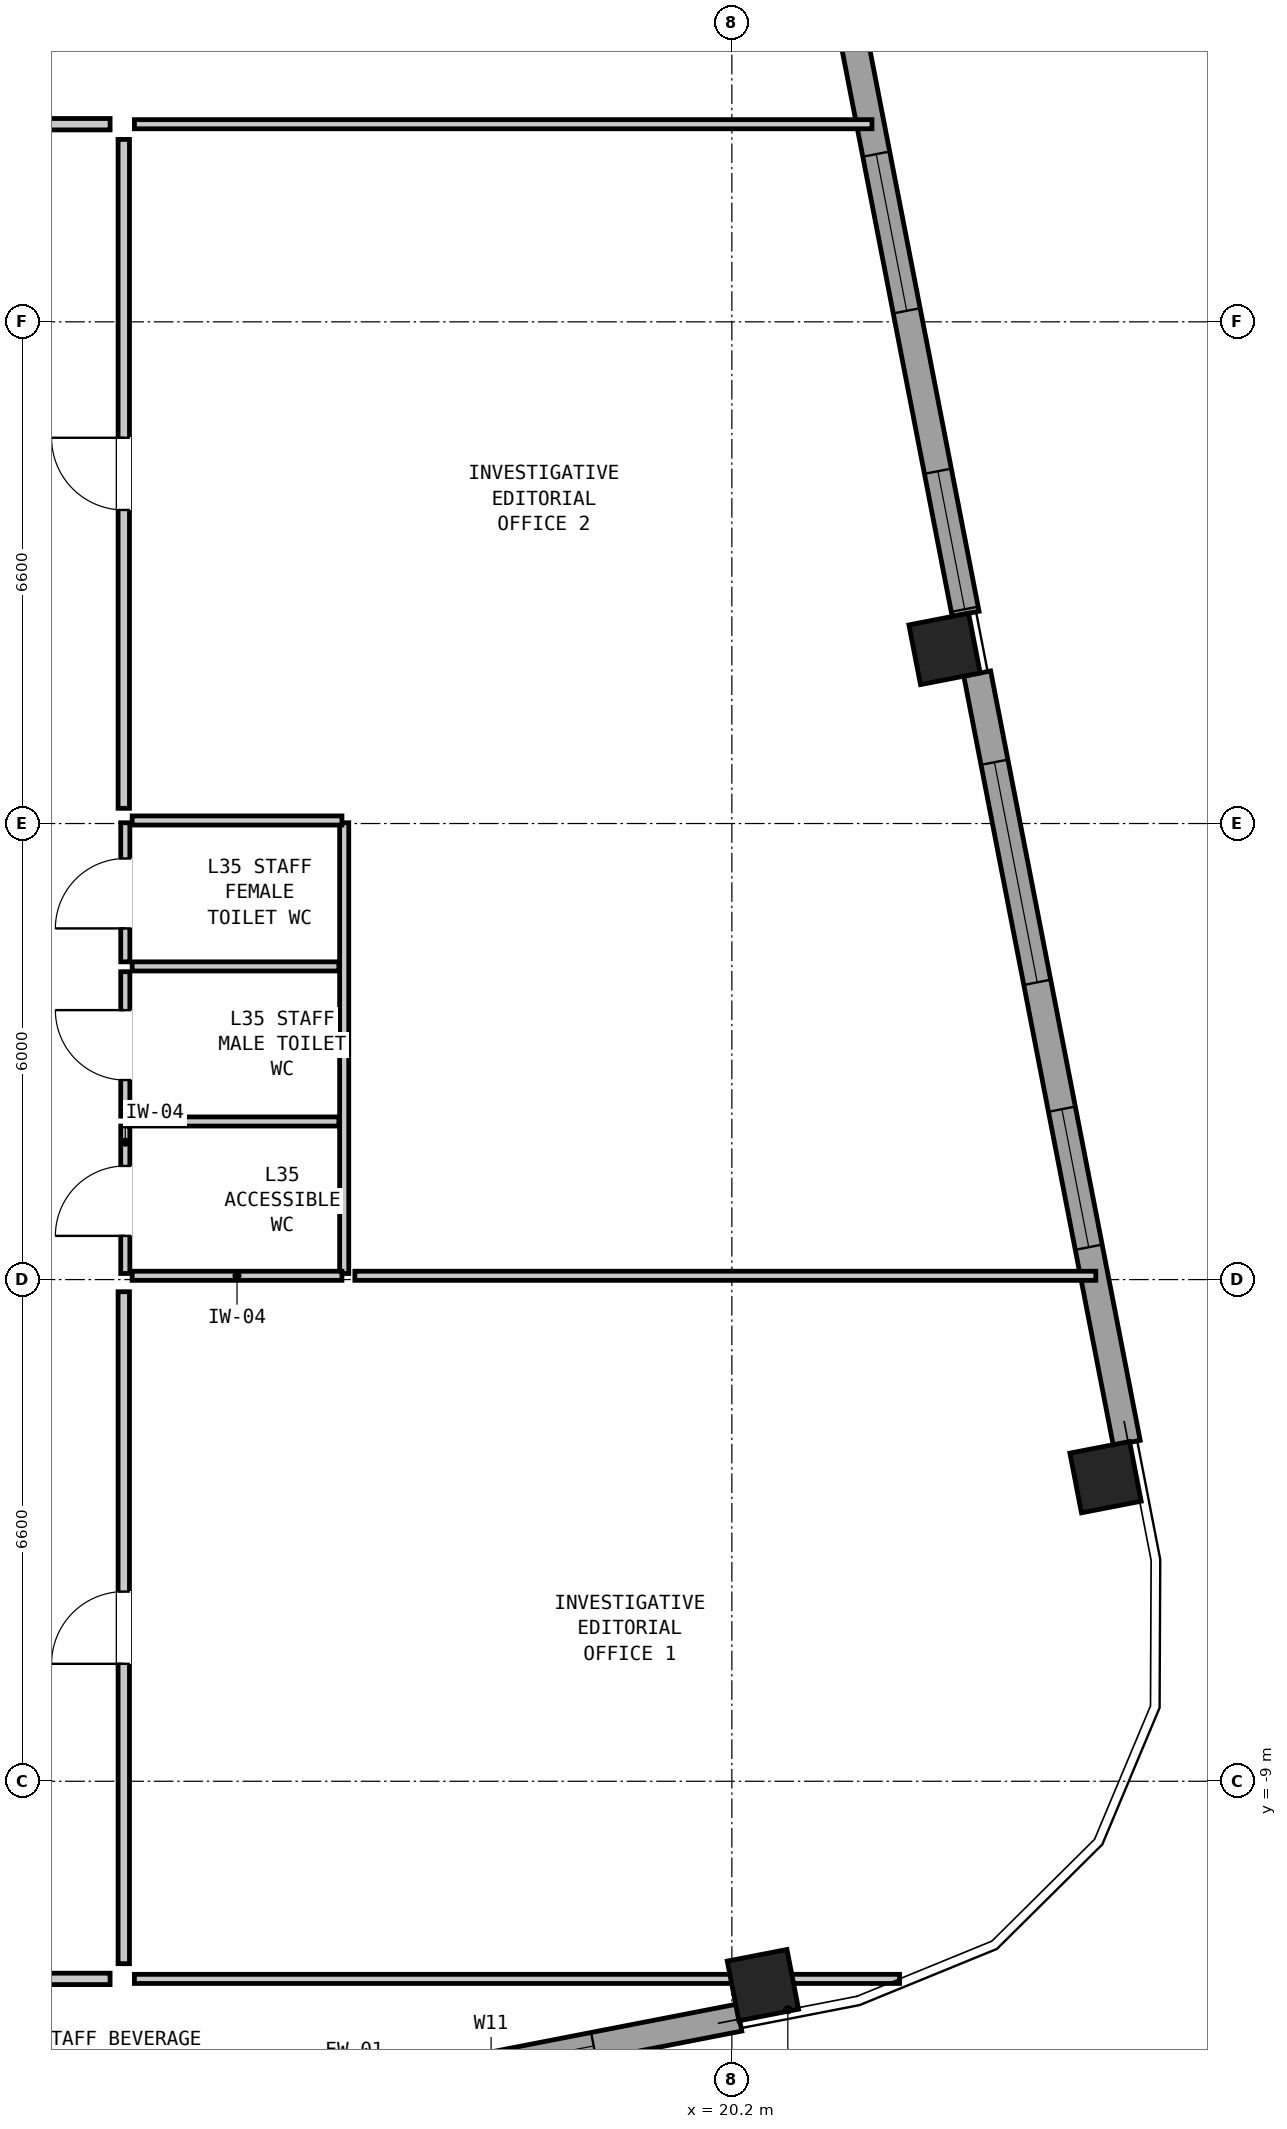
"""IFC4 building model, lengths in metres.
Left out: names, types, materials, properties, quantities, classifications, styles, units other than length and angle.
Written with IfcOpenShell. Run it as: python <this file> out.ifc"""

import sys

from ifc_helpers import new_model, si_unit, direction, frame, frame_2d, origin, origin_2d, place, context, subcontext, project, spatial, rectangle, hollow_rectangle, extrude, element, fill, save


model = new_model("IFC4")
c1 = context("Model", 3, precision=1e-05, world=origin(), true_north=direction((0.0, 1.0)))
c2 = subcontext(c1, "Body", "Model", "MODEL_VIEW")
j1 = project(units=[si_unit("LENGTHUNIT", "METRE"), si_unit("PLANEANGLEUNIT", "RADIAN")], contexts=[c1])
p1 = place(None, origin())
s1 = spatial("IfcSite", under=j1, at=p1, CompositionType="ELEMENT")
p2 = place(p1, origin())
s2 = spatial("IfcBuilding", under=s1, at=p2, CompositionType="ELEMENT")
p3 = place(p2, frame((0.0, 0.0, 121.95)))
s3 = spatial("IfcBuildingStorey", under=s2, at=p3, CompositionType="ELEMENT", Elevation=121.95)
for number, where, z_axis, x_axis in (
    (1, (20.609, -11.682, 0.0), (0.0, 0.0, 1.0), (0.982, 0.191, 0.0)),
    (2, (25.116, -5.0, 0.0), (0.0, 0.0, 1.0), (-0.191, 0.982, 0.0)),
    (3, (22.998, 5.896, 0.0), (0.0, 0.0, 1.0), (-0.191, 0.982, 0.0)),
):
    element("IfcColumn", number, at=place(p3, frame(where, z_axis=z_axis, x_axis=x_axis)), inside=s3, PredefinedType="COLUMN", context=c2, shape_type="SweptSolid", body=[
        extrude(hollow_rectangle(XDim=0.8, YDim=0.8, WallThickness=0.05, at=origin_2d()), origin(), (0.0, 0.0, 1.0), 3.05),
    ])
p4 = place(p3, frame((20.296, -12.11, 0.0), z_axis=(0.0, 0.0, 1.0), x_axis=(-0.981628941133, -0.190799952646, 0.0)))
e4 = element("IfcWall", 4, at=p4, inside=s3, PredefinedType="SOLIDWALL", context=c2, shape_type="SweptSolid", body=[
    extrude(rectangle(XDim=10.312, YDim=0.36, at=frame_2d((5.156, 0.0))), origin(), (0.0, 0.0, 1.0), 2.067),
])
p5 = place(p4, frame((1.95, 0.0, 0.2)))
e5 = element("IfcOpeningElement", 5, at=p5, cuts=e4, PredefinedType="OPENING", context=c2, shape_type="SweptSolid", body=[
    extrude(rectangle(XDim=2.75, YDim=0.95, at=frame_2d((1.375, 0.475))), frame((0.0, 0.192, 0.0), z_axis=(0.0, -1.0, 0.0), x_axis=(1.0, 0.0, 0.0)), (0.0, 0.0, 1.0), 0.384),
])
p6 = place(p4, frame((6.25, 0.0, 0.95)))
e6 = element("IfcOpeningElement", 6, at=p6, cuts=e4, PredefinedType="OPENING", context=c2, shape_type="SweptSolid", body=[
    extrude(rectangle(XDim=2.75, YDim=0.95, at=frame_2d((1.375, 0.475))), frame((0.0, 0.192, 0.0), z_axis=(0.0, -1.0, 0.0), x_axis=(1.0, 0.0, 0.0)), (0.0, 0.0, 1.0), 0.384),
])
p7 = place(p3, frame((21.31, 16.469, 0.0), z_axis=(0.0, 0.0, 1.0), x_axis=(0.190811924826, -0.981626614016, 0.0)))
e7 = element("IfcWall", 7, at=p7, inside=s3, PredefinedType="SOLIDWALL", context=c2, shape_type="SweptSolid", body=[
    extrude(rectangle(XDim=10.3, YDim=0.36, at=frame_2d((5.15, 0.0))), origin(), (0.0, 0.0, 1.0), 2.067),
])
p8 = place(p7, frame((0.038, 0.0, 0.2)))
e8 = element("IfcOpeningElement", 8, at=p8, cuts=e7, PredefinedType="OPENING", context=c2, shape_type="SweptSolid", body=[
    extrude(rectangle(XDim=1.8, YDim=1.25, at=frame_2d((0.9, 0.625))), frame((0.0, 0.192, 0.0), z_axis=(0.0, -1.0, 0.0), x_axis=(1.0, 0.0, 0.0)), (0.0, 0.0, 1.0), 0.384),
])
p9 = place(p7, frame((4.138, 0.0, 0.7)))
e9 = element("IfcOpeningElement", 9, at=p9, cuts=e7, PredefinedType="OPENING", context=c2, shape_type="SweptSolid", body=[
    extrude(rectangle(XDim=2.1, YDim=1.2, at=frame_2d((1.05, 0.6))), frame((0.0, 0.192, 0.0), z_axis=(0.0, -1.0, 0.0), x_axis=(1.0, 0.0, 0.0)), (0.0, 0.0, 1.0), 0.384),
])
p10 = place(p7, frame((8.388, 0.0, 0.2)))
e10 = element("IfcOpeningElement", 10, at=p10, cuts=e7, PredefinedType="OPENING", context=c2, shape_type="SweptSolid", body=[
    extrude(rectangle(XDim=1.85, YDim=1.2, at=frame_2d((0.925, 0.6))), frame((0.0, 0.192, 0.0), z_axis=(0.0, -1.0, 0.0), x_axis=(1.0, 0.0, 0.0)), (0.0, 0.0, 1.0), 0.384),
])
p11 = place(p3, frame((23.428, 5.573, 0.0), z_axis=(0.0, 0.0, 1.0), x_axis=(0.190827200853, -0.981623644486, 0.0)))
e11 = element("IfcWall", 11, at=p11, inside=s3, PredefinedType="SOLIDWALL", context=c2, shape_type="SweptSolid", body=[
    extrude(rectangle(XDim=10.312, YDim=0.36, at=frame_2d((5.156, 0.0))), origin(), (0.0, 0.0, 1.0), 2.067),
])
p12 = place(p11, frame((1.188, 0.0, 0.95)))
e12 = element("IfcOpeningElement", 12, at=p12, cuts=e11, PredefinedType="OPENING", context=c2, shape_type="SweptSolid", body=[
    extrude(rectangle(XDim=2.95, YDim=0.95, at=frame_2d((1.475, 0.475))), frame((0.0, 0.192, 0.0), z_axis=(0.0, -1.0, 0.0), x_axis=(1.0, 0.0, 0.0)), (0.0, 0.0, 1.0), 0.384),
])
p13 = place(p11, frame((5.838, 0.0, 0.2)))
e13 = element("IfcOpeningElement", 13, at=p13, cuts=e11, PredefinedType="OPENING", context=c2, shape_type="SweptSolid", body=[
    extrude(rectangle(XDim=1.85, YDim=1.15, at=frame_2d((0.925, 0.575))), frame((0.0, 0.192, 0.0), z_axis=(0.0, -1.0, 0.0), x_axis=(1.0, 0.0, 0.0)), (0.0, 0.0, 1.0), 0.384),
])
p14 = place(p3, frame((12.22, -2.32, 0.0), z_axis=(0.0, 0.0, 1.0), x_axis=(0.0, 1.0, 0.0)))
e14 = element("IfcWall", 14, at=p14, inside=s3, PredefinedType="PARTITIONING", context=c2, shape_type="SweptSolid", body=[
    extrude(rectangle(XDim=1.94, YDim=0.12, at=frame_2d((0.97, 0.0))), origin(), (0.0, 0.0, 1.0), 2.83),
])
p15 = place(p14, frame((0.495, 0.0, 0.0)))
e15 = element("IfcOpeningElement", 15, at=p15, cuts=e14, PredefinedType="OPENING", context=c2, shape_type="SweptSolid", body=[
    extrude(rectangle(XDim=0.92, YDim=2.1, at=frame_2d((0.46, 1.05))), frame((0.0, 0.072, 0.0), z_axis=(0.0, -1.0, 0.0), x_axis=(1.0, 0.0, 0.0)), (0.0, 0.0, 1.0), 0.144),
])
p16 = place(p3, frame((12.22, -0.25, 0.0), z_axis=(0.0, 0.0, 1.0), x_axis=(0.0, 1.0, 0.0)))
e16 = element("IfcWall", 16, at=p16, inside=s3, PredefinedType="PARTITIONING", context=c2, shape_type="SweptSolid", body=[
    extrude(rectangle(XDim=1.9, YDim=0.12, at=frame_2d((0.95, 0.0))), origin(), (0.0, 0.0, 1.0), 2.83),
])
p17 = place(p16, frame((0.475, 0.0, 0.0)))
e17 = element("IfcOpeningElement", 17, at=p17, cuts=e16, PredefinedType="OPENING", context=c2, shape_type="SweptSolid", body=[
    extrude(rectangle(XDim=0.92, YDim=2.1, at=frame_2d((0.46, 1.05))), frame((0.0, 0.072, 0.0), z_axis=(0.0, -1.0, 0.0), x_axis=(1.0, 0.0, 0.0)), (0.0, 0.0, 1.0), 0.144),
])
p18 = place(p3, frame((12.22, 1.78, 0.0), z_axis=(0.0, 0.0, 1.0), x_axis=(0.0, 1.0, 0.0)))
e18 = element("IfcWall", 18, at=p18, inside=s3, PredefinedType="PARTITIONING", context=c2, shape_type="SweptSolid", body=[
    extrude(rectangle(XDim=1.83, YDim=0.12, at=frame_2d((0.915, 0.0))), origin(), (0.0, 0.0, 1.0), 2.83),
])
p19 = place(p18, frame((0.44, 0.0, 0.0)))
e19 = element("IfcOpeningElement", 19, at=p19, cuts=e18, PredefinedType="OPENING", context=c2, shape_type="SweptSolid", body=[
    extrude(rectangle(XDim=0.92, YDim=2.1, at=frame_2d((0.46, 1.05))), frame((0.0, 0.072, 0.0), z_axis=(0.0, -1.0, 0.0), x_axis=(1.0, 0.0, 0.0)), (0.0, 0.0, 1.0), 0.144),
])
p20 = place(p3, frame((15.1, -2.32, 0.0), z_axis=(0.0, 0.0, 1.0), x_axis=(0.0, 1.0, 0.0)))
e20 = element("IfcWall", 20, at=p20, inside=s3, PredefinedType="PARTITIONING", context=c2, shape_type="SweptSolid", body=[
    extrude(rectangle(XDim=5.93, YDim=0.12, at=frame_2d((2.965, 0.0))), origin(), (0.0, 0.0, 1.0), 2.83),
])
for number, where, z_axis, x_axis in (
    (21, (12.31, -2.35, 0.0), (0.0, 0.0, 1.0), (1.0, 0.0, 0.0)),
    (22, (12.31, 3.64, 0.0), (0.0, 0.0, 1.0), (1.0, 0.0, 0.0)),
):
    element("IfcWall", number, at=place(p3, frame(where, z_axis=z_axis, x_axis=x_axis)), inside=s3, PredefinedType="PARTITIONING", context=c2, shape_type="SweptSolid", body=[
        extrude(rectangle(XDim=2.76, YDim=0.12, at=frame_2d((1.38, 0.0))), origin(), (0.0, 0.0, 1.0), 1.883),
    ])
for number, where, z_axis, x_axis in (
    (23, (12.31, -0.32, 0.0), (0.0, 0.0, 1.0), (1.0, 0.0, 0.0)),
    (24, (12.31, 1.72, 0.0), (0.0, 0.0, 1.0), (1.0, 0.0, 0.0)),
):
    element("IfcWall", number, at=place(p3, frame(where, z_axis=z_axis, x_axis=x_axis)), inside=s3, PredefinedType="PARTITIONING", context=c2, shape_type="SweptSolid", body=[
        extrude(rectangle(XDim=2.72, YDim=0.12, at=frame_2d((1.36, 0.0))), origin(), (0.0, 0.0, 1.0), 2.83),
    ])
p21 = place(p3, frame((12.34, 12.8, 0.0), z_axis=(0.0, 0.0, 1.0), x_axis=(1.0, 0.0, 0.0)))
e25 = element("IfcWall", 25, at=p21, inside=s3, PredefinedType="PARTITIONING", context=c2, shape_type="SweptSolid", body=[
    extrude(rectangle(XDim=9.703, YDim=0.12, at=frame_2d((4.852, 0.0))), origin(), (0.0, 0.0, 1.0), 2.83),
])
p22 = place(p3, frame((12.34, -11.6, 0.0), z_axis=(0.0, 0.0, 1.0), x_axis=(1.0, 0.0, 0.0)))
e26 = element("IfcWall", 26, at=p22, inside=s3, PredefinedType="PARTITIONING", context=c2, shape_type="SweptSolid", body=[
    extrude(rectangle(XDim=10.066, YDim=0.12, at=frame_2d((5.033, 0.0))), origin(), (0.0, 0.0, 1.0), 2.127),
])
p23 = place(p3, frame((15.24, -2.35, 0.0), z_axis=(0.0, 0.0, 1.0), x_axis=(1.0, 0.0, 0.0)))
e27 = element("IfcWall", 27, at=p23, inside=s3, PredefinedType="PARTITIONING", context=c2, shape_type="SweptSolid", body=[
    extrude(rectangle(XDim=9.748, YDim=0.12, at=frame_2d((4.874, 0.0))), origin(), (0.0, 0.0, 1.0), 1.883),
])
p24 = place(p3, frame((8.58, 12.8, 0.0), z_axis=(0.0, 0.0, 1.0), x_axis=(1.0, 0.0, 0.0)))
e28 = element("IfcWall", 28, at=p24, inside=s3, PredefinedType="PARTITIONING", context=c2, shape_type="SweptSolid", body=[
    extrude(rectangle(XDim=3.44, YDim=0.15, at=frame_2d((1.72, 0.0))), origin(), (0.0, 0.0, 1.0), 2.83),
])
p25 = place(p24, frame((1.245, 0.0, 0.0)))
e29 = element("IfcOpeningElement", 29, at=p25, cuts=e28, PredefinedType="OPENING", context=c2, shape_type="SweptSolid", body=[
    extrude(rectangle(XDim=0.95, YDim=2.1, at=frame_2d((0.475, 1.05))), frame((0.0, 0.087, 0.0), z_axis=(0.0, -1.0, 0.0), x_axis=(1.0, 0.0, 0.0)), (0.0, 0.0, 1.0), 0.174),
])
p26 = place(p3, frame((8.58, -11.6, 0.0), z_axis=(0.0, 0.0, 1.0), x_axis=(1.0, 0.0, 0.0)))
e30 = element("IfcWall", 30, at=p26, inside=s3, PredefinedType="PARTITIONING", context=c2, shape_type="SweptSolid", body=[
    extrude(rectangle(XDim=3.44, YDim=0.15, at=frame_2d((1.72, 0.0))), origin(), (0.0, 0.0, 1.0), 2.347),
])
p27 = place(p26, frame((1.245, 0.0, 0.0)))
e31 = element("IfcOpeningElement", 31, at=p27, cuts=e30, PredefinedType="OPENING", context=c2, shape_type="SweptSolid", body=[
    extrude(rectangle(XDim=0.95, YDim=2.1, at=frame_2d((0.475, 1.05))), frame((0.0, 0.087, 0.0), z_axis=(0.0, -1.0, 0.0), x_axis=(1.0, 0.0, 0.0)), (0.0, 0.0, 1.0), 0.174),
])
p28 = place(p3, frame((12.2, -11.4, 0.0), z_axis=(0.0, 0.0, 1.0), x_axis=(0.0, 1.0, 0.0)))
e32 = element("IfcWall", 32, at=p28, inside=s3, PredefinedType="PARTITIONING", context=c2, shape_type="SweptSolid", body=[
    extrude(rectangle(XDim=8.84, YDim=0.15, at=frame_2d((4.42, 0.0))), origin(), (0.0, 0.0, 1.0), 2.83),
])
p29 = place(p28, frame((3.945, 0.0, 0.0)))
e33 = element("IfcOpeningElement", 33, at=p29, cuts=e32, PredefinedType="OPENING", context=c2, shape_type="SweptSolid", body=[
    extrude(rectangle(XDim=0.95, YDim=2.1, at=frame_2d((0.475, 1.05))), frame((0.0, 0.087, 0.0), z_axis=(0.0, -1.0, 0.0), x_axis=(1.0, 0.0, 0.0)), (0.0, 0.0, 1.0), 0.174),
])
p30 = place(p3, frame((12.2, 3.8, 0.0), z_axis=(0.0, 0.0, 1.0), x_axis=(0.0, 1.0, 0.0)))
e34 = element("IfcWall", 34, at=p30, inside=s3, PredefinedType="PARTITIONING", context=c2, shape_type="SweptSolid", body=[
    extrude(rectangle(XDim=8.8, YDim=0.15, at=frame_2d((4.4, 0.0))), origin(), (0.0, 0.0, 1.0), 2.83),
])
p31 = place(p30, frame((3.925, 0.0, 0.0)))
e35 = element("IfcOpeningElement", 35, at=p31, cuts=e34, PredefinedType="OPENING", context=c2, shape_type="SweptSolid", body=[
    extrude(rectangle(XDim=0.95, YDim=2.1, at=frame_2d((0.475, 1.05))), frame((0.0, 0.087, 0.0), z_axis=(0.0, -1.0, 0.0), x_axis=(1.0, 0.0, 0.0)), (0.0, 0.0, 1.0), 0.174),
])
p32 = place(p5, origin())
e36 = element("IfcWindow", 36, at=p32, inside=s3, PartitioningType="SINGLE_PANEL", PredefinedType="WINDOW", context=c2, shape_type="SweptSolid", body=[
    extrude(rectangle(XDim=2.75, YDim=0.95, at=frame_2d((1.375, 0.475))), frame((0.0, 0.03, 0.0), z_axis=(0.0, -1.0, 0.0), x_axis=(1.0, 0.0, 0.0)), (0.0, 0.0, 1.0), 0.06),
])
fill(e5, e36)
p33 = place(p9, origin())
e37 = element("IfcWindow", 37, at=p33, inside=s3, PartitioningType="SINGLE_PANEL", PredefinedType="WINDOW", context=c2, shape_type="SweptSolid", body=[
    extrude(rectangle(XDim=2.1, YDim=1.2, at=frame_2d((1.05, 0.6))), frame((0.0, 0.03, 0.0), z_axis=(0.0, -1.0, 0.0), x_axis=(1.0, 0.0, 0.0)), (0.0, 0.0, 1.0), 0.06),
])
fill(e9, e37)
p34 = place(p10, origin())
e38 = element("IfcWindow", 38, at=p34, inside=s3, PartitioningType="SINGLE_PANEL", PredefinedType="WINDOW", context=c2, shape_type="SweptSolid", body=[
    extrude(rectangle(XDim=1.85, YDim=1.2, at=frame_2d((0.925, 0.6))), frame((0.0, 0.03, 0.0), z_axis=(0.0, -1.0, 0.0), x_axis=(1.0, 0.0, 0.0)), (0.0, 0.0, 1.0), 0.06),
])
fill(e10, e38)
p35 = place(p12, origin())
e39 = element("IfcWindow", 39, at=p35, inside=s3, PartitioningType="SINGLE_PANEL", PredefinedType="WINDOW", context=c2, shape_type="SweptSolid", body=[
    extrude(rectangle(XDim=2.95, YDim=0.95, at=frame_2d((1.475, 0.475))), frame((0.0, 0.03, 0.0), z_axis=(0.0, -1.0, 0.0), x_axis=(1.0, 0.0, 0.0)), (0.0, 0.0, 1.0), 0.06),
])
fill(e12, e39)
p36 = place(p13, origin())
e40 = element("IfcWindow", 40, at=p36, inside=s3, PartitioningType="SINGLE_PANEL", PredefinedType="WINDOW", context=c2, shape_type="SweptSolid", body=[
    extrude(rectangle(XDim=1.85, YDim=1.15, at=frame_2d((0.925, 0.575))), frame((0.0, 0.03, 0.0), z_axis=(0.0, -1.0, 0.0), x_axis=(1.0, 0.0, 0.0)), (0.0, 0.0, 1.0), 0.06),
])
fill(e13, e40)
p37 = place(p15, origin())
e41 = element("IfcDoor", 41, at=p37, inside=s3, OperationType="SINGLE_SWING_LEFT", PredefinedType="DOOR", context=c2, shape_type="SweptSolid", body=[
    extrude(rectangle(XDim=0.92, YDim=2.1, at=frame_2d((0.46, 1.05))), frame((0.0, 0.025, 0.0), z_axis=(0.0, -1.0, 0.0), x_axis=(1.0, 0.0, 0.0)), (0.0, 0.0, 1.0), 0.05),
])
fill(e15, e41)
p38 = place(p17, origin())
e42 = element("IfcDoor", 42, at=p38, inside=s3, OperationType="SINGLE_SWING_RIGHT", PredefinedType="DOOR", context=c2, shape_type="SweptSolid", body=[
    extrude(rectangle(XDim=0.92, YDim=2.1, at=frame_2d((0.46, 1.05))), frame((0.0, 0.025, 0.0), z_axis=(0.0, -1.0, 0.0), x_axis=(1.0, 0.0, 0.0)), (0.0, 0.0, 1.0), 0.05),
])
fill(e17, e42)
p39 = place(p19, origin())
e43 = element("IfcDoor", 43, at=p39, inside=s3, OperationType="SINGLE_SWING_LEFT", PredefinedType="DOOR", context=c2, shape_type="SweptSolid", body=[
    extrude(rectangle(XDim=0.92, YDim=2.1, at=frame_2d((0.46, 1.05))), frame((0.0, 0.025, 0.0), z_axis=(0.0, -1.0, 0.0), x_axis=(1.0, 0.0, 0.0)), (0.0, 0.0, 1.0), 0.05),
])
fill(e19, e43)
p40 = place(p29, origin())
e44 = element("IfcDoor", 44, at=p40, inside=s3, OperationType="SINGLE_SWING_LEFT", PredefinedType="DOOR", context=c2, shape_type="SweptSolid", body=[
    extrude(rectangle(XDim=0.95, YDim=2.1, at=frame_2d((0.475, 1.05))), frame((0.0, 0.025, 0.0), z_axis=(0.0, -1.0, 0.0), x_axis=(1.0, 0.0, 0.0)), (0.0, 0.0, 1.0), 0.05),
])
fill(e33, e44)
p41 = place(p31, origin())
e45 = element("IfcDoor", 45, at=p41, inside=s3, OperationType="SINGLE_SWING_RIGHT", PredefinedType="DOOR", context=c2, shape_type="SweptSolid", body=[
    extrude(rectangle(XDim=0.95, YDim=2.1, at=frame_2d((0.475, 1.05))), frame((0.0, 0.025, 0.0), z_axis=(0.0, -1.0, 0.0), x_axis=(1.0, 0.0, 0.0)), (0.0, 0.0, 1.0), 0.05),
])
fill(e35, e45)
save(model, sys.argv[1])
